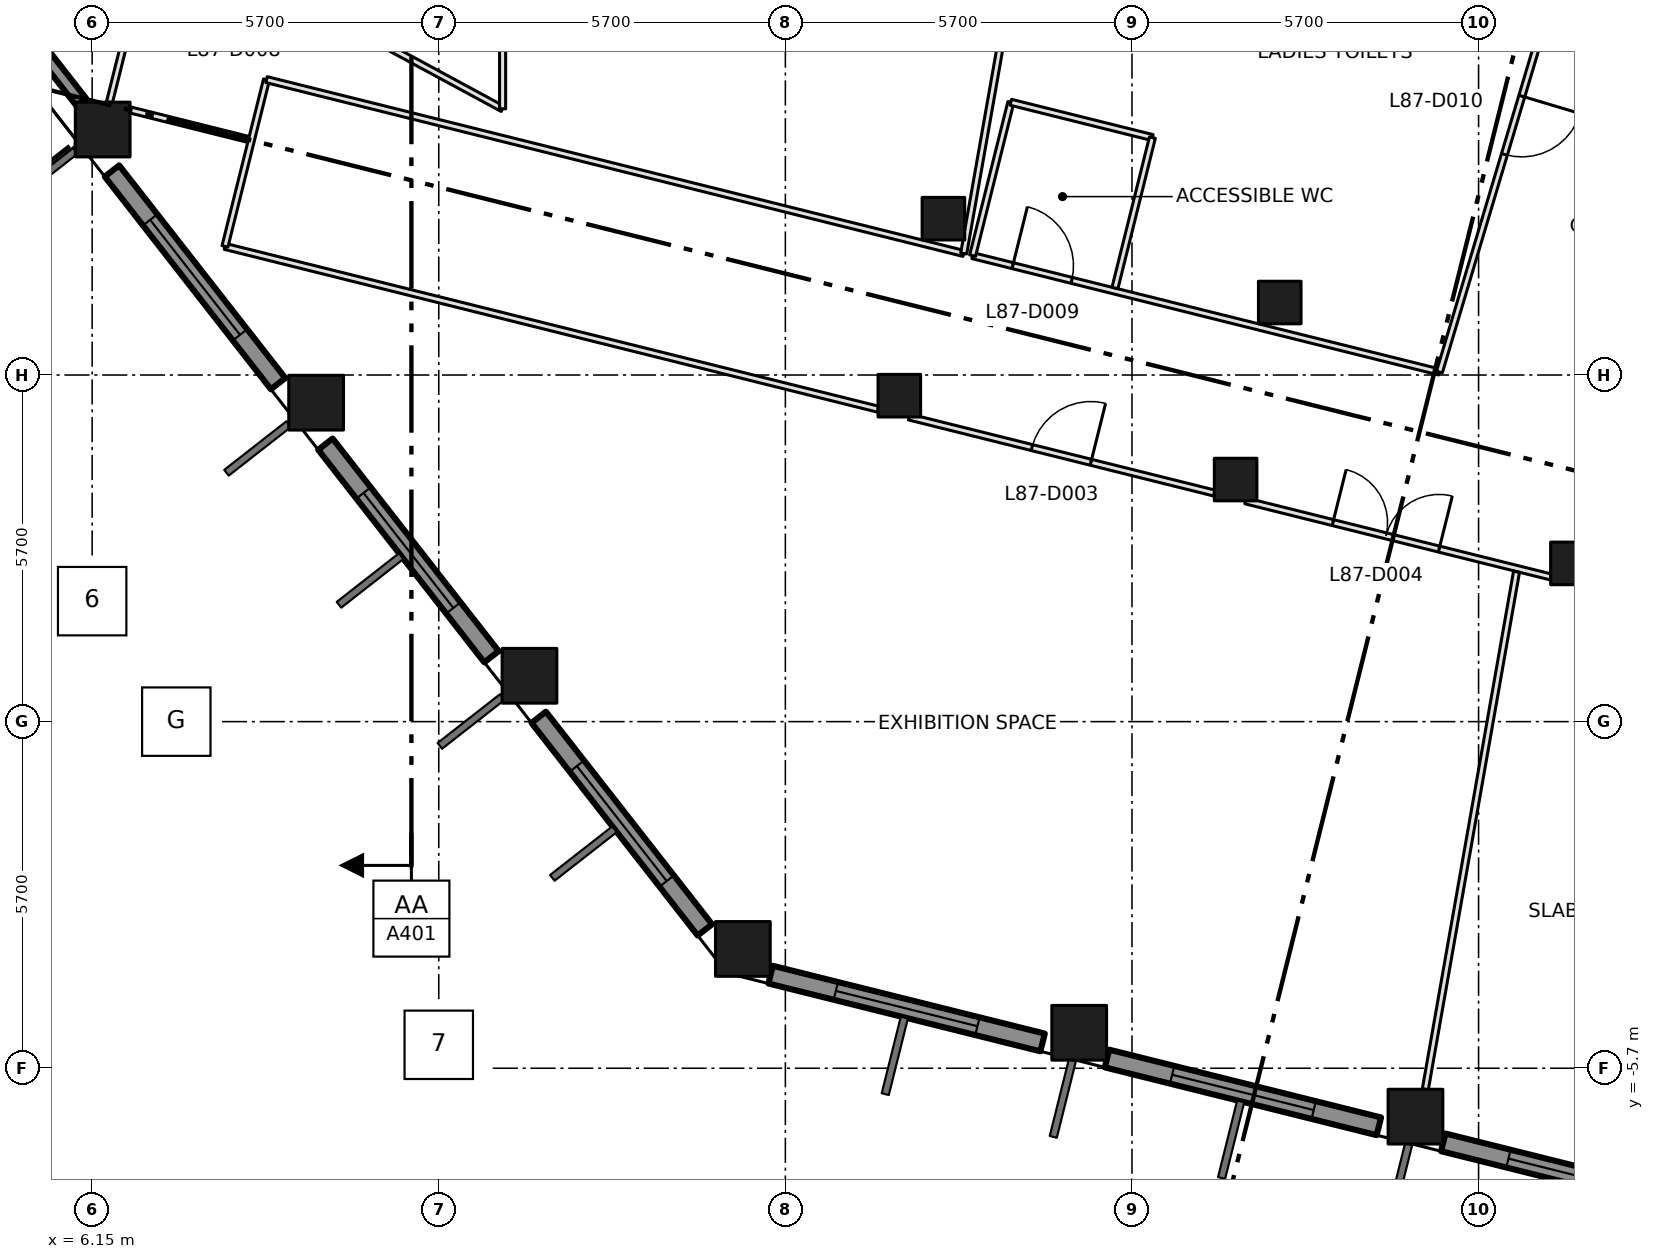
"""IFC4 building model, lengths in metres.
Left out: names, types, materials, properties, quantities, classifications, styles, units other than length and angle.
Written with IfcOpenShell. Run it as: python <this file> out.ifc"""

import sys

from ifc_helpers import new_model, si_unit, direction, frame, frame_2d, origin, origin_2d, place, context, subcontext, project, spatial, rectangle, extrude, element, fill, save


model = new_model("IFC4")
c1 = context("Model", 3, precision=1e-05, world=origin(), true_north=direction((0.0, 1.0)))
c2 = subcontext(c1, "Body", "Model", "MODEL_VIEW")
j1 = project(units=[si_unit("LENGTHUNIT", "METRE"), si_unit("PLANEANGLEUNIT", "RADIAN")], contexts=[c1])
p1 = place(None, origin())
s1 = spatial("IfcSite", under=j1, at=p1, CompositionType="ELEMENT")
p2 = place(p1, origin())
s2 = spatial("IfcBuilding", under=s1, at=p2, CompositionType="ELEMENT")
p3 = place(p2, frame((0.0, 0.0, 379.2)))
s3 = spatial("IfcBuildingStorey", under=s2, at=p3, CompositionType="ELEMENT", Elevation=379.2)
for number, where, z_axis, x_axis in (
    (1, (16.851, -3.738, 0.0), (0.0, 0.0, 1.0), (1.0, 0.0, 0.0)),
    (2, (13.342, 0.754, 0.0), (0.0, 0.0, 1.0), (1.0, 0.0, 0.0)),
    (3, (9.833, 5.245, 0.0), (0.0, 0.0, 1.0), (1.0, 0.0, 0.0)),
    (4, (6.323, 9.737, 0.0), (0.0, 0.0, 1.0), (1.0, 0.0, 0.0)),
    (5, (22.382, -5.117, 0.0), (0.0, 0.0, 1.0), (1.0, 0.0, 0.0)),
    (6, (27.912, -6.496, 0.0), (0.0, 0.0, 1.0), (1.0, 0.0, 0.0)),
):
    element("IfcColumn", number, at=place(p3, frame(where, z_axis=z_axis, x_axis=x_axis)), inside=s3, PredefinedType="COLUMN", context=c2, shape_type="SweptSolid", body=[
        extrude(rectangle(XDim=0.9, YDim=0.9, at=origin_2d()), origin(), (0.0, 0.0, 1.0), 4.2),
    ])
for number, where, z_axis, x_axis in (
    (7, (19.424, 5.36, 0.0), (0.0, 0.0, 1.0), (1.0, 0.0, 0.0)),
    (8, (24.954, 3.981, 0.0), (0.0, 0.0, 1.0), (1.0, 0.0, 0.0)),
    (9, (30.485, 2.602, 0.0), (0.0, 0.0, 1.0), (1.0, 0.0, 0.0)),
    (10, (20.149, 8.271, 0.0), (0.0, 0.0, 1.0), (1.0, 0.0, 0.0)),
    (11, (25.68, 6.892, 0.0), (0.0, 0.0, 1.0), (1.0, 0.0, 0.0)),
):
    element("IfcColumn", number, at=place(p3, frame(where, z_axis=z_axis, x_axis=x_axis)), inside=s3, PredefinedType="COLUMN", context=c2, shape_type="SweptSolid", body=[
        extrude(rectangle(XDim=0.7, YDim=0.7, at=origin_2d()), origin(), (0.0, 0.0, 1.0), 4.2),
    ])
p4 = place(p3, frame((3.166, 13.779, 0.0), z_axis=(0.0, 0.0, 1.0), x_axis=(0.615593109271, -0.788064162247, 0.0)))
e12 = element("IfcWall", 12, at=p4, inside=s3, PredefinedType="SOLIDWALL", context=c2, shape_type="SweptSolid", body=[
    extrude(rectangle(XDim=4.558, YDim=0.2, at=frame_2d((2.279, 0.0))), origin(), (0.0, 0.0, 1.0), 3.2),
])
p5 = place(p4, frame((1.378, 0.0, 0.0)))
e13 = element("IfcOpeningElement", 13, at=p5, cuts=e12, PredefinedType="OPENING", context=c2, shape_type="SweptSolid", body=[
    extrude(rectangle(XDim=1.8, YDim=2.9, at=frame_2d((0.9, 1.45))), frame((0.0, 0.11, 0.0), z_axis=(0.0, -1.0, 0.0), x_axis=(1.0, 0.0, 0.0)), (0.0, 0.0, 1.0), 0.22),
])
p6 = place(p3, frame((6.476, 9.055, 0.0), z_axis=(0.0, 0.0, 1.0), x_axis=(0.615649380255, -0.788020203162, 0.0)))
e14 = element("IfcWall", 14, at=p6, inside=s3, PredefinedType="SOLIDWALL", context=c2, shape_type="SweptSolid", body=[
    extrude(rectangle(XDim=4.438, YDim=0.3, at=frame_2d((2.219, 0.0))), origin(), (0.0, 0.0, 1.0), 3.2),
])
p7 = place(p6, frame((1.019, 0.0, 0.8)))
e15 = element("IfcOpeningElement", 15, at=p7, cuts=e14, PredefinedType="OPENING", context=c2, shape_type="SweptSolid", body=[
    extrude(rectangle(XDim=2.4, YDim=2.1, at=frame_2d((1.2, 1.05))), frame((0.0, 0.16, 0.0), z_axis=(0.0, -1.0, 0.0), x_axis=(1.0, 0.0, 0.0)), (0.0, 0.0, 1.0), 0.32),
])
p8 = place(p3, frame((9.986, 4.563, 0.0), z_axis=(0.0, 0.0, 1.0), x_axis=(0.615592779411, -0.788064419915, 0.0)))
e16 = element("IfcWall", 16, at=p8, inside=s3, PredefinedType="SOLIDWALL", context=c2, shape_type="SweptSolid", body=[
    extrude(rectangle(XDim=4.436, YDim=0.3, at=frame_2d((2.218, 0.0))), origin(), (0.0, 0.0, 1.0), 3.2),
])
p9 = place(p8, frame((1.018, 0.0, 0.8)))
e17 = element("IfcOpeningElement", 17, at=p9, cuts=e16, PredefinedType="OPENING", context=c2, shape_type="SweptSolid", body=[
    extrude(rectangle(XDim=2.4, YDim=2.1, at=frame_2d((1.2, 1.05))), frame((0.0, 0.16, 0.0), z_axis=(0.0, -1.0, 0.0), x_axis=(1.0, 0.0, 0.0)), (0.0, 0.0, 1.0), 0.32),
])
p10 = place(p3, frame((13.494, 0.071, 0.0), z_axis=(0.0, 0.0, 1.0), x_axis=(0.615763624226, -0.787930935476, 0.0)))
e18 = element("IfcWall", 18, at=p10, inside=s3, PredefinedType="SOLIDWALL", context=c2, shape_type="SweptSolid", body=[
    extrude(rectangle(XDim=4.437, YDim=0.3, at=frame_2d((2.219, 0.0))), origin(), (0.0, 0.0, 1.0), 3.2),
])
p11 = place(p10, frame((1.018, 0.0, 0.8)))
e19 = element("IfcOpeningElement", 19, at=p11, cuts=e18, PredefinedType="OPENING", context=c2, shape_type="SweptSolid", body=[
    extrude(rectangle(XDim=2.4, YDim=2.1, at=frame_2d((1.2, 1.05))), frame((0.0, 0.16, 0.0), z_axis=(0.0, -1.0, 0.0), x_axis=(1.0, 0.0, 0.0)), (0.0, 0.0, 1.0), 0.32),
])
p12 = place(p3, frame((17.308, -4.161, 0.0), z_axis=(0.0, 0.0, 1.0), x_axis=(0.970294992984, -0.241924836652, 0.0)))
e20 = element("IfcWall", 20, at=p12, inside=s3, PredefinedType="SOLIDWALL", context=c2, shape_type="SweptSolid", body=[
    extrude(rectangle(XDim=4.609, YDim=0.3, at=frame_2d((2.304, 0.0))), origin(), (0.0, 0.0, 1.0), 3.2),
])
p13 = place(p12, frame((1.105, 0.0, 0.8)))
e21 = element("IfcOpeningElement", 21, at=p13, cuts=e20, PredefinedType="OPENING", context=c2, shape_type="SweptSolid", body=[
    extrude(rectangle(XDim=2.4, YDim=2.1, at=frame_2d((1.2, 1.05))), frame((0.0, 0.16, 0.0), z_axis=(0.0, -1.0, 0.0), x_axis=(1.0, 0.0, 0.0)), (0.0, 0.0, 1.0), 0.32),
])
p14 = place(p3, frame((22.839, -5.54, 0.0), z_axis=(0.0, 0.0, 1.0), x_axis=(0.970282587769, -0.241974585177, 0.0)))
e22 = element("IfcWall", 22, at=p14, inside=s3, PredefinedType="SOLIDWALL", context=c2, shape_type="SweptSolid", body=[
    extrude(rectangle(XDim=4.608, YDim=0.3, at=frame_2d((2.304, 0.0))), origin(), (0.0, 0.0, 1.0), 3.2),
])
p15 = place(p14, frame((1.104, 0.0, 0.8)))
e23 = element("IfcOpeningElement", 23, at=p15, cuts=e22, PredefinedType="OPENING", context=c2, shape_type="SweptSolid", body=[
    extrude(rectangle(XDim=2.4, YDim=2.1, at=frame_2d((1.2, 1.05))), frame((0.0, 0.16, 0.0), z_axis=(0.0, -1.0, 0.0), x_axis=(1.0, 0.0, 0.0)), (0.0, 0.0, 1.0), 0.32),
])
p16 = place(p3, frame((28.369, -6.919, 0.0), z_axis=(0.0, 0.0, 1.0), x_axis=(0.970298093093, -0.241912402618, 0.0)))
e24 = element("IfcWall", 24, at=p16, inside=s3, PredefinedType="SOLIDWALL", context=c2, shape_type="SweptSolid", body=[
    extrude(rectangle(XDim=4.609, YDim=0.3, at=frame_2d((2.305, 0.0))), origin(), (0.0, 0.0, 1.0), 3.2),
])
p17 = place(p16, frame((1.105, 0.0, 0.8)))
e25 = element("IfcOpeningElement", 25, at=p17, cuts=e24, PredefinedType="OPENING", context=c2, shape_type="SweptSolid", body=[
    extrude(rectangle(XDim=2.4, YDim=2.1, at=frame_2d((1.2, 1.05))), frame((0.0, 0.16, 0.0), z_axis=(0.0, -1.0, 0.0), x_axis=(1.0, 0.0, 0.0)), (0.0, 0.0, 1.0), 0.32),
])
p18 = place(p3, frame((8.334, 7.815, 0.0), z_axis=(0.0, 0.0, 1.0), x_axis=(0.970312231044, -0.241855688968, 0.0)))
e26 = element("IfcWall", 26, at=p18, inside=s3, PredefinedType="PARTITIONING", context=c2, shape_type="SweptSolid", body=[
    extrude(rectangle(XDim=11.069, YDim=0.1, at=frame_2d((5.534, 0.0))), origin(), (0.0, 0.0, 1.0), 3.9),
])
p19 = place(p3, frame((9.017, 10.558, 0.0), z_axis=(0.0, 0.0, 1.0), x_axis=(-0.241641419317, -0.970365613813, 0.0)))
e27 = element("IfcWall", 27, at=p19, inside=s3, PredefinedType="PARTITIONING", context=c2, shape_type="SweptSolid", body=[
    extrude(rectangle(XDim=2.827, YDim=0.1, at=frame_2d((1.414, 0.0))), origin(), (0.0, 0.0, 1.0), 3.9),
])
p20 = place(p3, frame((9.9, 11.7, 0.0), z_axis=(0.0, 0.0, 1.0), x_axis=(0.87965147249, -0.475618846291, 0.0)))
e28 = element("IfcWall", 28, at=p20, inside=s3, PredefinedType="PARTITIONING", context=c2, shape_type="SweptSolid", body=[
    extrude(rectangle(XDim=3.41, YDim=0.1, at=frame_2d((1.705, 0.0))), origin(), (0.0, 0.0, 1.0), 3.9),
])
p21 = place(p3, frame((12.9, 10.078, 0.0), z_axis=(0.0, 0.0, 1.0), x_axis=(0.0, 1.0, 0.0)))
e29 = element("IfcWall", 29, at=p21, inside=s3, PredefinedType="PARTITIONING", context=c2, shape_type="SweptSolid", body=[
    extrude(rectangle(XDim=4.022, YDim=0.1, at=frame_2d((2.011, 0.0))), origin(), (0.0, 0.0, 1.0), 3.9),
])
p22 = place(p3, frame((19.586, 5.01, 0.0), z_axis=(0.0, 0.0, 1.0), x_axis=(0.970303347181, -0.241891327769, 0.0)))
e30 = element("IfcWall", 30, at=p22, inside=s3, PredefinedType="PARTITIONING", context=c2, shape_type="SweptSolid", body=[
    extrude(rectangle(XDim=5.172, YDim=0.1, at=frame_2d((2.586, 0.0))), origin(), (0.0, 0.0, 1.0), 3.9),
])
p23 = place(p22, frame((2.08, 0.0, 0.0)))
e31 = element("IfcOpeningElement", 31, at=p23, cuts=e30, PredefinedType="OPENING", context=c2, shape_type="SweptSolid", body=[
    extrude(rectangle(XDim=1.0, YDim=2.1, at=frame_2d((0.5, 1.05))), frame((0.0, 0.06, 0.0), z_axis=(0.0, -1.0, 0.0), x_axis=(1.0, 0.0, 0.0)), (0.0, 0.0, 1.0), 0.12),
])
p24 = place(p3, frame((20.483, 7.699, 0.0), z_axis=(0.0, 0.0, 1.0), x_axis=(-0.970288161847, 0.241952232846, 0.0)))
e32 = element("IfcWall", 32, at=p24, inside=s3, PredefinedType="PARTITIONING", context=c2, shape_type="SweptSolid", body=[
    extrude(rectangle(XDim=11.817, YDim=0.1, at=frame_2d((5.908, 0.0))), origin(), (0.0, 0.0, 1.0), 3.9),
])
p25 = place(p3, frame((20.629, 7.663, 0.0), z_axis=(0.0, 0.0, 1.0), x_axis=(0.970296588572, -0.241918437093, 0.0)))
e33 = element("IfcWall", 33, at=p25, inside=s3, PredefinedType="PARTITIONING", context=c2, shape_type="SweptSolid", body=[
    extrude(rectangle(XDim=7.912, YDim=0.1, at=frame_2d((3.956, 0.0))), origin(), (0.0, 0.0, 1.0), 3.9),
])
p26 = place(p25, frame((0.68, 0.0, 0.0)))
e34 = element("IfcOpeningElement", 34, at=p26, cuts=e33, PredefinedType="OPENING", context=c2, shape_type="SweptSolid", body=[
    extrude(rectangle(XDim=1.0, YDim=2.1, at=frame_2d((0.5, 1.05))), frame((0.0, 0.06, 0.0), z_axis=(0.0, -1.0, 0.0), x_axis=(1.0, 0.0, 0.0)), (0.0, 0.0, 1.0), 0.12),
])
p27 = place(p3, frame((25.118, 3.631, 0.0), z_axis=(0.0, 0.0, 1.0), x_axis=(0.970281210621, -0.241980107272, 0.0)))
e35 = element("IfcWall", 35, at=p27, inside=s3, PredefinedType="PARTITIONING", context=c2, shape_type="SweptSolid", body=[
    extrude(rectangle(XDim=5.171, YDim=0.1, at=frame_2d((2.585, 0.0))), origin(), (0.0, 0.0, 1.0), 3.9),
])
p28 = place(p27, frame((1.48, 0.0, 0.0)))
e36 = element("IfcOpeningElement", 36, at=p28, cuts=e35, PredefinedType="OPENING", context=c2, shape_type="SweptSolid", body=[
    extrude(rectangle(XDim=1.8, YDim=2.1, at=frame_2d((0.9, 1.05))), frame((0.0, 0.06, 0.0), z_axis=(0.0, -1.0, 0.0), x_axis=(1.0, 0.0, 0.0)), (0.0, 0.0, 1.0), 0.12),
])
p29 = place(p3, frame((30.8, 14.1, 0.0), z_axis=(0.0, 0.0, 1.0), x_axis=(-0.286170650389, -0.958178667502, 0.0)))
e37 = element("IfcWall", 37, at=p29, inside=s3, PredefinedType="PARTITIONING", context=c2, shape_type="SweptSolid", body=[
    extrude(rectangle(XDim=8.716, YDim=0.1, at=frame_2d((4.358, 0.0))), origin(), (0.0, 0.0, 1.0), 3.9),
])
p30 = place(p29, frame((3.98, 0.0, 0.0)))
e38 = element("IfcOpeningElement", 38, at=p30, cuts=e37, PredefinedType="OPENING", context=c2, shape_type="SweptSolid", body=[
    extrude(rectangle(XDim=1.0, YDim=2.1, at=frame_2d((0.5, 1.05))), frame((0.0, 0.06, 0.0), z_axis=(0.0, -1.0, 0.0), x_axis=(1.0, 0.0, 0.0)), (0.0, 0.0, 1.0), 0.12),
])
p31 = place(p3, frame((6.797, 11.638, 0.0), z_axis=(0.0, 0.0, 1.0), x_axis=(-0.242113049408, -0.970248046278, 0.0)))
e39 = element("IfcWall", 39, at=p31, inside=s3, PredefinedType="PARTITIONING", context=c2, shape_type="SweptSolid", body=[
    extrude(rectangle(XDim=1.495, YDim=0.1, at=frame_2d((0.748, 0.0))), origin(), (0.0, 0.0, 1.0), 3.9),
])
p32 = place(p3, frame((8.72, 9.574, 0.0), z_axis=(0.0, 0.0, 1.0), x_axis=(-0.970221168815, 0.24222073318, 0.0)))
e40 = element("IfcWall", 40, at=p32, inside=s3, PredefinedType="PARTITIONING", context=c2, shape_type="SweptSolid", body=[
    extrude(rectangle(XDim=2.007, YDim=0.1, at=frame_2d((1.003, 0.0))), origin(), (0.0, 0.0, 1.0), 3.9),
])
p33 = place(p3, frame((20.483, 7.699, 0.0), z_axis=(0.0, 0.0, 1.0), x_axis=(0.173716766884, 0.98479565642, 0.0)))
e41 = element("IfcWall", 41, at=p33, inside=s3, PredefinedType="PARTITIONING", context=c2, shape_type="SweptSolid", body=[
    extrude(rectangle(XDim=6.5, YDim=0.1, at=frame_2d((3.25, 0.0))), origin(), (0.0, 0.0, 1.0), 3.9),
])
p34 = place(p3, frame((20.629, 7.663, 0.0), z_axis=(0.0, 0.0, 1.0), x_axis=(0.242049385216, 0.970263930648, 0.0)))
e42 = element("IfcWall", 42, at=p34, inside=s3, PredefinedType="PARTITIONING", context=c2, shape_type="SweptSolid", body=[
    extrude(rectangle(XDim=2.599, YDim=0.1, at=frame_2d((1.3, 0.0))), origin(), (0.0, 0.0, 1.0), 3.9),
])
p35 = place(p3, frame((21.258, 10.185, 0.0), z_axis=(0.0, 0.0, 1.0), x_axis=(0.970327787359, -0.241793269299, 0.0)))
e43 = element("IfcWall", 43, at=p35, inside=s3, PredefinedType="PARTITIONING", context=c2, shape_type="SweptSolid", body=[
    extrude(rectangle(XDim=2.399, YDim=0.1, at=frame_2d((1.2, 0.0))), origin(), (0.0, 0.0, 1.0), 3.9),
])
p36 = place(p3, frame((23.586, 9.605, 0.0), z_axis=(0.0, 0.0, 1.0), x_axis=(-0.241611677547, -0.970373019654, 0.0)))
e44 = element("IfcWall", 44, at=p36, inside=s3, PredefinedType="PARTITIONING", context=c2, shape_type="SweptSolid", body=[
    extrude(rectangle(XDim=2.549, YDim=0.1, at=frame_2d((1.275, 0.0))), origin(), (0.0, 0.0, 1.0), 3.9),
])
p37 = place(p3, frame((28.074, -6.046, 0.0), z_axis=(0.0, 0.0, 1.0), x_axis=(0.173567767041, 0.98482192819, 0.0)))
e45 = element("IfcWall", 45, at=p37, inside=s3, PredefinedType="PARTITIONING", context=c2, shape_type="SweptSolid", body=[
    extrude(rectangle(XDim=8.642, YDim=0.1, at=frame_2d((4.321, 0.0))), origin(), (0.0, 0.0, 1.0), 3.9),
])
p38 = place(p7, origin())
e46 = element("IfcWindow", 46, at=p38, inside=s3, PartitioningType="DOUBLE_PANEL_VERTICAL", PredefinedType="WINDOW", context=c2, shape_type="SweptSolid", body=[
    extrude(rectangle(XDim=2.4, YDim=2.1, at=frame_2d((1.2, 1.05))), frame((0.0, 0.03, 0.0), z_axis=(0.0, -1.0, 0.0), x_axis=(1.0, 0.0, 0.0)), (0.0, 0.0, 1.0), 0.06),
])
fill(e15, e46)
p39 = place(p9, origin())
e47 = element("IfcWindow", 47, at=p39, inside=s3, PartitioningType="DOUBLE_PANEL_VERTICAL", PredefinedType="WINDOW", context=c2, shape_type="SweptSolid", body=[
    extrude(rectangle(XDim=2.4, YDim=2.1, at=frame_2d((1.2, 1.05))), frame((0.0, 0.03, 0.0), z_axis=(0.0, -1.0, 0.0), x_axis=(1.0, 0.0, 0.0)), (0.0, 0.0, 1.0), 0.06),
])
fill(e17, e47)
p40 = place(p11, origin())
e48 = element("IfcWindow", 48, at=p40, inside=s3, PartitioningType="DOUBLE_PANEL_VERTICAL", PredefinedType="WINDOW", context=c2, shape_type="SweptSolid", body=[
    extrude(rectangle(XDim=2.4, YDim=2.1, at=frame_2d((1.2, 1.05))), frame((0.0, 0.03, 0.0), z_axis=(0.0, -1.0, 0.0), x_axis=(1.0, 0.0, 0.0)), (0.0, 0.0, 1.0), 0.06),
])
fill(e19, e48)
p41 = place(p13, origin())
e49 = element("IfcWindow", 49, at=p41, inside=s3, PartitioningType="DOUBLE_PANEL_VERTICAL", PredefinedType="WINDOW", context=c2, shape_type="SweptSolid", body=[
    extrude(rectangle(XDim=2.4, YDim=2.1, at=frame_2d((1.2, 1.05))), frame((0.0, 0.03, 0.0), z_axis=(0.0, -1.0, 0.0), x_axis=(1.0, 0.0, 0.0)), (0.0, 0.0, 1.0), 0.06),
])
fill(e21, e49)
p42 = place(p15, origin())
e50 = element("IfcWindow", 50, at=p42, inside=s3, PartitioningType="DOUBLE_PANEL_VERTICAL", PredefinedType="WINDOW", context=c2, shape_type="SweptSolid", body=[
    extrude(rectangle(XDim=2.4, YDim=2.1, at=frame_2d((1.2, 1.05))), frame((0.0, 0.03, 0.0), z_axis=(0.0, -1.0, 0.0), x_axis=(1.0, 0.0, 0.0)), (0.0, 0.0, 1.0), 0.06),
])
fill(e23, e50)
p43 = place(p17, origin())
e51 = element("IfcWindow", 51, at=p43, inside=s3, PartitioningType="DOUBLE_PANEL_VERTICAL", PredefinedType="WINDOW", context=c2, shape_type="SweptSolid", body=[
    extrude(rectangle(XDim=2.4, YDim=2.1, at=frame_2d((1.2, 1.05))), frame((0.0, 0.03, 0.0), z_axis=(0.0, -1.0, 0.0), x_axis=(1.0, 0.0, 0.0)), (0.0, 0.0, 1.0), 0.06),
])
fill(e25, e51)
p44 = place(p23, origin())
e52 = element("IfcDoor", 52, at=p44, inside=s3, OperationType="SINGLE_SWING_RIGHT", PredefinedType="DOOR", context=c2, shape_type="SweptSolid", body=[
    extrude(rectangle(XDim=1.0, YDim=2.1, at=frame_2d((0.5, 1.05))), frame((0.0, 0.025, 0.0), z_axis=(0.0, -1.0, 0.0), x_axis=(1.0, 0.0, 0.0)), (0.0, 0.0, 1.0), 0.05),
])
fill(e31, e52)
p45 = place(p28, origin())
e53 = element("IfcDoor", 53, at=p45, inside=s3, OperationType="DOUBLE_DOOR_SINGLE_SWING", PredefinedType="DOOR", context=c2, shape_type="SweptSolid", body=[
    extrude(rectangle(XDim=1.8, YDim=2.1, at=frame_2d((0.9, 1.05))), frame((0.0, 0.025, 0.0), z_axis=(0.0, -1.0, 0.0), x_axis=(1.0, 0.0, 0.0)), (0.0, 0.0, 1.0), 0.05),
])
fill(e36, e53)
p46 = place(p26, origin())
e54 = element("IfcDoor", 54, at=p46, inside=s3, OperationType="SINGLE_SWING_LEFT", PredefinedType="DOOR", context=c2, shape_type="SweptSolid", body=[
    extrude(rectangle(XDim=1.0, YDim=2.1, at=frame_2d((0.5, 1.05))), frame((0.0, 0.025, 0.0), z_axis=(0.0, -1.0, 0.0), x_axis=(1.0, 0.0, 0.0)), (0.0, 0.0, 1.0), 0.05),
])
fill(e34, e54)
p47 = place(p30, origin())
e55 = element("IfcDoor", 55, at=p47, inside=s3, OperationType="SINGLE_SWING_LEFT", PredefinedType="DOOR", context=c2, shape_type="SweptSolid", body=[
    extrude(rectangle(XDim=1.0, YDim=2.1, at=frame_2d((0.5, 1.05))), frame((0.0, 0.025, 0.0), z_axis=(0.0, -1.0, 0.0), x_axis=(1.0, 0.0, 0.0)), (0.0, 0.0, 1.0), 0.05),
])
fill(e38, e55)
save(model, sys.argv[1])
